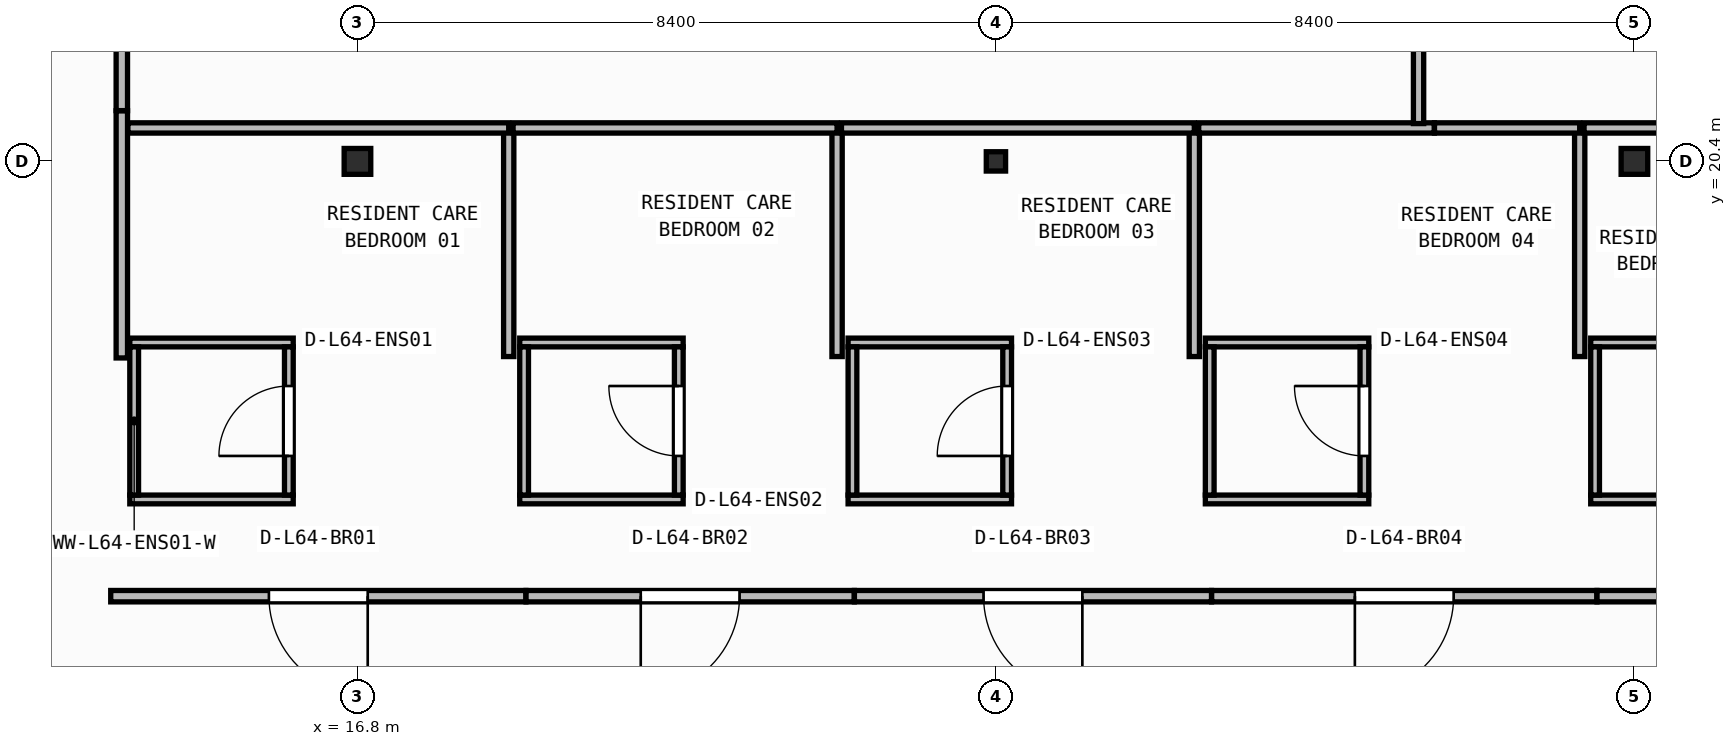
"""IFC4 building model, lengths in metres.
Left out: names, types, materials, properties, quantities, classifications, styles, units other than length and angle.
Written with IfcOpenShell. Run it as: python <this file> out.ifc"""

import sys

from ifc_helpers import new_model, si_unit, direction, frame, frame_2d, origin, origin_2d, place, context, subcontext, project, spatial, rectangle, i_section, extrude, element, fill, save


model = new_model("IFC4")
c1 = context("Model", 3, precision=1e-05, world=origin(), true_north=direction((0.0, 1.0)))
c2 = subcontext(c1, "Body", "Model", "MODEL_VIEW")
j1 = project(units=[si_unit("LENGTHUNIT", "METRE"), si_unit("PLANEANGLEUNIT", "RADIAN")], contexts=[c1])
p1 = place(None, origin())
s1 = spatial("IfcSite", under=j1, at=p1, CompositionType="ELEMENT")
p2 = place(p1, origin())
s2 = spatial("IfcBuilding", under=s1, at=p2, CompositionType="ELEMENT")
p3 = place(p2, frame((0.0, 0.0, 260.5)))
s3 = spatial("IfcBuildingStorey", under=s2, at=p3, CompositionType="ELEMENT", Elevation=260.5)
p4 = place(p3, frame((16.8, 20.4, 0.0), z_axis=(0.0, 0.0, 1.0), x_axis=(1.0, 0.0, 0.0)))
e1 = element("IfcColumn", 1, at=p4, inside=s3, PredefinedType="COLUMN", context=c2, shape_type="SweptSolid", body=[
    extrude(i_section(OverallWidth=0.35, OverallDepth=0.34, WebThickness=0.016, FlangeThickness=0.028, at=origin_2d()), origin(), (0.0, 0.0, 1.0), 3.95),
])
p5 = place(p3, frame((25.2, 20.4, 0.0), z_axis=(0.0, 0.0, 1.0), x_axis=(1.0, 0.0, 0.0)))
e2 = element("IfcColumn", 2, at=p5, inside=s3, PredefinedType="COLUMN", context=c2, shape_type="SweptSolid", body=[
    extrude(i_section(OverallWidth=0.254, OverallDepth=0.254, WebThickness=0.009, FlangeThickness=0.014, FilletRadius=0.013, at=origin_2d()), origin(), (0.0, 0.0, 1.0), 3.95),
])
p6 = place(p3, frame((33.6, 20.4, 0.0), z_axis=(0.0, 0.0, 1.0), x_axis=(1.0, 0.0, 0.0)))
e3 = element("IfcColumn", 3, at=p6, inside=s3, PredefinedType="COLUMN", context=c2, shape_type="SweptSolid", body=[
    extrude(i_section(OverallWidth=0.35, OverallDepth=0.34, WebThickness=0.016, FlangeThickness=0.028, at=origin_2d()), origin(), (0.0, 0.0, 1.0), 3.95),
])
for number, where, z_axis, x_axis in (
    (4, (13.805, 15.952, 0.0), (0.0, 0.0, 1.0), (1.0, 0.0, 0.0)),
    (5, (13.805, 18.018, 0.0), (0.0, 0.0, 1.0), (1.0, 0.0, 0.0)),
):
    element("IfcWall", number, at=place(p3, frame(where, z_axis=z_axis, x_axis=x_axis)), inside=s3, PredefinedType="PARTITIONING", context=c2, shape_type="SweptSolid", body=[
        extrude(rectangle(XDim=2.15, YDim=0.115, at=frame_2d((1.075, 0.0))), origin(), (0.0, 0.0, 1.0), 3.71),
    ])
p7 = place(p3, frame((13.863, 16.01, 0.0), z_axis=(0.0, 0.0, 1.0), x_axis=(0.0, 1.0, 0.0)))
e6 = element("IfcWall", 6, at=p7, inside=s3, PredefinedType="PARTITIONING", context=c2, shape_type="SweptSolid", body=[
    extrude(rectangle(XDim=1.95, YDim=0.115, at=frame_2d((0.975, 0.0))), origin(), (0.0, 0.0, 1.0), 3.71),
])
p8 = place(p3, frame((15.897, 16.01, 0.0), z_axis=(0.0, 0.0, 1.0), x_axis=(0.0, 1.0, 0.0)))
e7 = element("IfcWall", 7, at=p8, inside=s3, PredefinedType="PARTITIONING", context=c2, shape_type="SweptSolid", body=[
    extrude(rectangle(XDim=1.95, YDim=0.115, at=frame_2d((0.975, 0.0))), origin(), (0.0, 0.0, 1.0), 3.71),
])
p9 = place(p8, frame((0.515, 0.0, 0.0)))
e8 = element("IfcOpeningElement", 8, at=p9, cuts=e7, PredefinedType="OPENING", context=c2, shape_type="SweptSolid", body=[
    extrude(rectangle(XDim=0.92, YDim=2.1, at=frame_2d((0.46, 1.05))), frame((0.0, 0.067, 0.0), z_axis=(0.0, -1.0, 0.0), x_axis=(1.0, 0.0, 0.0)), (0.0, 0.0, 1.0), 0.135),
])
for number, where, z_axis, x_axis in (
    (9, (18.935, 15.952, 0.0), (0.0, 0.0, 1.0), (1.0, 0.0, 0.0)),
    (10, (18.935, 18.018, 0.0), (0.0, 0.0, 1.0), (1.0, 0.0, 0.0)),
):
    element("IfcWall", number, at=place(p3, frame(where, z_axis=z_axis, x_axis=x_axis)), inside=s3, PredefinedType="PARTITIONING", context=c2, shape_type="SweptSolid", body=[
        extrude(rectangle(XDim=2.15, YDim=0.115, at=frame_2d((1.075, 0.0))), origin(), (0.0, 0.0, 1.0), 3.71),
    ])
p10 = place(p3, frame((18.992, 16.01, 0.0), z_axis=(0.0, 0.0, 1.0), x_axis=(0.0, 1.0, 0.0)))
e11 = element("IfcWall", 11, at=p10, inside=s3, PredefinedType="PARTITIONING", context=c2, shape_type="SweptSolid", body=[
    extrude(rectangle(XDim=1.95, YDim=0.115, at=frame_2d((0.975, 0.0))), origin(), (0.0, 0.0, 1.0), 3.71),
])
p11 = place(p3, frame((21.028, 16.01, 0.0), z_axis=(0.0, 0.0, 1.0), x_axis=(0.0, 1.0, 0.0)))
e12 = element("IfcWall", 12, at=p11, inside=s3, PredefinedType="PARTITIONING", context=c2, shape_type="SweptSolid", body=[
    extrude(rectangle(XDim=1.95, YDim=0.115, at=frame_2d((0.975, 0.0))), origin(), (0.0, 0.0, 1.0), 3.71),
])
p12 = place(p11, frame((0.515, 0.0, 0.0)))
e13 = element("IfcOpeningElement", 13, at=p12, cuts=e12, PredefinedType="OPENING", context=c2, shape_type="SweptSolid", body=[
    extrude(rectangle(XDim=0.92, YDim=2.1, at=frame_2d((0.46, 1.05))), frame((0.0, 0.067, 0.0), z_axis=(0.0, -1.0, 0.0), x_axis=(1.0, 0.0, 0.0)), (0.0, 0.0, 1.0), 0.135),
])
p13 = place(p3, frame((23.255, 15.952, 0.0), z_axis=(0.0, 0.0, 1.0), x_axis=(1.0, 0.0, 0.0)))
e14 = element("IfcWall", 14, at=p13, inside=s3, PredefinedType="PARTITIONING", context=c2, shape_type="SweptSolid", body=[
    extrude(rectangle(XDim=2.15, YDim=0.115, at=frame_2d((1.075, 0.0))), origin(), (0.0, 0.0, 1.0), 3.429),
])
p14 = place(p3, frame((23.255, 18.018, 0.0), z_axis=(0.0, 0.0, 1.0), x_axis=(1.0, 0.0, 0.0)))
e15 = element("IfcWall", 15, at=p14, inside=s3, PredefinedType="PARTITIONING", context=c2, shape_type="SweptSolid", body=[
    extrude(rectangle(XDim=2.15, YDim=0.115, at=frame_2d((1.075, 0.0))), origin(), (0.0, 0.0, 1.0), 3.71),
])
p15 = place(p3, frame((23.312, 16.01, 0.0), z_axis=(0.0, 0.0, 1.0), x_axis=(0.0, 1.0, 0.0)))
e16 = element("IfcWall", 16, at=p15, inside=s3, PredefinedType="PARTITIONING", context=c2, shape_type="SweptSolid", body=[
    extrude(rectangle(XDim=1.95, YDim=0.115, at=frame_2d((0.975, 0.0))), origin(), (0.0, 0.0, 1.0), 3.71),
])
p16 = place(p3, frame((25.347, 16.01, 0.0), z_axis=(0.0, 0.0, 1.0), x_axis=(0.0, 1.0, 0.0)))
e17 = element("IfcWall", 17, at=p16, inside=s3, PredefinedType="PARTITIONING", context=c2, shape_type="SweptSolid", body=[
    extrude(rectangle(XDim=1.95, YDim=0.115, at=frame_2d((0.975, 0.0))), origin(), (0.0, 0.0, 1.0), 3.157),
])
p17 = place(p16, frame((0.515, 0.0, 0.0)))
e18 = element("IfcOpeningElement", 18, at=p17, cuts=e17, PredefinedType="OPENING", context=c2, shape_type="SweptSolid", body=[
    extrude(rectangle(XDim=0.92, YDim=2.1, at=frame_2d((0.46, 1.05))), frame((0.0, 0.067, 0.0), z_axis=(0.0, -1.0, 0.0), x_axis=(1.0, 0.0, 0.0)), (0.0, 0.0, 1.0), 0.135),
])
p18 = place(p3, frame((27.955, 15.952, 0.0), z_axis=(0.0, 0.0, 1.0), x_axis=(1.0, 0.0, 0.0)))
e19 = element("IfcWall", 19, at=p18, inside=s3, PredefinedType="PARTITIONING", context=c2, shape_type="SweptSolid", body=[
    extrude(rectangle(XDim=2.15, YDim=0.115, at=frame_2d((1.075, 0.0))), origin(), (0.0, 0.0, 1.0), 3.429),
])
p19 = place(p3, frame((27.955, 18.018, 0.0), z_axis=(0.0, 0.0, 1.0), x_axis=(1.0, 0.0, 0.0)))
e20 = element("IfcWall", 20, at=p19, inside=s3, PredefinedType="PARTITIONING", context=c2, shape_type="SweptSolid", body=[
    extrude(rectangle(XDim=2.15, YDim=0.115, at=frame_2d((1.075, 0.0))), origin(), (0.0, 0.0, 1.0), 3.71),
])
p20 = place(p3, frame((28.012, 16.01, 0.0), z_axis=(0.0, 0.0, 1.0), x_axis=(0.0, 1.0, 0.0)))
e21 = element("IfcWall", 21, at=p20, inside=s3, PredefinedType="PARTITIONING", context=c2, shape_type="SweptSolid", body=[
    extrude(rectangle(XDim=1.95, YDim=0.115, at=frame_2d((0.975, 0.0))), origin(), (0.0, 0.0, 1.0), 3.71),
])
p21 = place(p3, frame((30.048, 16.01, 0.0), z_axis=(0.0, 0.0, 1.0), x_axis=(0.0, 1.0, 0.0)))
e22 = element("IfcWall", 22, at=p21, inside=s3, PredefinedType="PARTITIONING", context=c2, shape_type="SweptSolid", body=[
    extrude(rectangle(XDim=1.95, YDim=0.115, at=frame_2d((0.975, 0.0))), origin(), (0.0, 0.0, 1.0), 3.71),
])
p22 = place(p21, frame((0.515, 0.0, 0.0)))
e23 = element("IfcOpeningElement", 23, at=p22, cuts=e22, PredefinedType="OPENING", context=c2, shape_type="SweptSolid", body=[
    extrude(rectangle(XDim=0.92, YDim=2.1, at=frame_2d((0.46, 1.05))), frame((0.0, 0.067, 0.0), z_axis=(0.0, -1.0, 0.0), x_axis=(1.0, 0.0, 0.0)), (0.0, 0.0, 1.0), 0.135),
])
p23 = place(p3, frame((33.025, 15.952, 0.0), z_axis=(0.0, 0.0, 1.0), x_axis=(1.0, 0.0, 0.0)))
e24 = element("IfcWall", 24, at=p23, inside=s3, PredefinedType="PARTITIONING", context=c2, shape_type="SweptSolid", body=[
    extrude(rectangle(XDim=2.15, YDim=0.115, at=frame_2d((1.075, 0.0))), origin(), (0.0, 0.0, 1.0), 3.429),
])
p24 = place(p3, frame((33.025, 18.018, 0.0), z_axis=(0.0, 0.0, 1.0), x_axis=(1.0, 0.0, 0.0)))
e25 = element("IfcWall", 25, at=p24, inside=s3, PredefinedType="PARTITIONING", context=c2, shape_type="SweptSolid", body=[
    extrude(rectangle(XDim=2.15, YDim=0.115, at=frame_2d((1.075, 0.0))), origin(), (0.0, 0.0, 1.0), 3.71),
])
p25 = place(p3, frame((33.083, 16.01, 0.0), z_axis=(0.0, 0.0, 1.0), x_axis=(0.0, 1.0, 0.0)))
e26 = element("IfcWall", 26, at=p25, inside=s3, PredefinedType="PARTITIONING", context=c2, shape_type="SweptSolid", body=[
    extrude(rectangle(XDim=1.95, YDim=0.115, at=frame_2d((0.975, 0.0))), origin(), (0.0, 0.0, 1.0), 3.71),
])
p26 = place(p3, frame((19.016, 14.68, 0.0), z_axis=(0.0, 0.0, 1.0), x_axis=(-1.0, 0.0, 0.0)))
e27 = element("IfcWall", 27, at=p26, inside=s3, PredefinedType="PARTITIONING", context=c2, shape_type="SweptSolid", body=[
    extrude(rectangle(XDim=5.462, YDim=0.15, at=frame_2d((2.731, 0.0))), origin(), (0.0, 0.0, 1.0), 3.71),
])
p27 = place(p26, frame((2.081, 0.0, 0.0)))
e28 = element("IfcOpeningElement", 28, at=p27, cuts=e27, PredefinedType="OPENING", context=c2, shape_type="SweptSolid", body=[
    extrude(rectangle(XDim=1.3, YDim=2.15, at=frame_2d((0.65, 1.075))), frame((0.0, 0.085, 0.0), z_axis=(0.0, -1.0, 0.0), x_axis=(1.0, 0.0, 0.0)), (0.0, 0.0, 1.0), 0.17),
])
p28 = place(p3, frame((23.336, 14.68, 0.0), z_axis=(0.0, 0.0, 1.0), x_axis=(-1.0, 0.0, 0.0)))
e29 = element("IfcWall", 29, at=p28, inside=s3, PredefinedType="PARTITIONING", context=c2, shape_type="SweptSolid", body=[
    extrude(rectangle(XDim=4.318, YDim=0.15, at=frame_2d((2.159, 0.0))), origin(), (0.0, 0.0, 1.0), 3.71),
])
p29 = place(p28, frame((1.509, 0.0, 0.0)))
e30 = element("IfcOpeningElement", 30, at=p29, cuts=e29, PredefinedType="OPENING", context=c2, shape_type="SweptSolid", body=[
    extrude(rectangle(XDim=1.3, YDim=2.15, at=frame_2d((0.65, 1.075))), frame((0.0, 0.085, 0.0), z_axis=(0.0, -1.0, 0.0), x_axis=(1.0, 0.0, 0.0)), (0.0, 0.0, 1.0), 0.17),
])
p30 = place(p3, frame((28.036, 14.68, 0.0), z_axis=(0.0, 0.0, 1.0), x_axis=(-1.0, 0.0, 0.0)))
e31 = element("IfcWall", 31, at=p30, inside=s3, PredefinedType="PARTITIONING", context=c2, shape_type="SweptSolid", body=[
    extrude(rectangle(XDim=4.698, YDim=0.15, at=frame_2d((2.349, 0.0))), origin(), (0.0, 0.0, 1.0), 3.71),
])
p31 = place(p30, frame((1.699, 0.0, 0.0)))
e32 = element("IfcOpeningElement", 32, at=p31, cuts=e31, PredefinedType="OPENING", context=c2, shape_type="SweptSolid", body=[
    extrude(rectangle(XDim=1.3, YDim=2.15, at=frame_2d((0.65, 1.075))), frame((0.0, 0.085, 0.0), z_axis=(0.0, -1.0, 0.0), x_axis=(1.0, 0.0, 0.0)), (0.0, 0.0, 1.0), 0.17),
])
p32 = place(p3, frame((33.106, 14.68, 0.0), z_axis=(0.0, 0.0, 1.0), x_axis=(-1.0, 0.0, 0.0)))
e33 = element("IfcWall", 33, at=p32, inside=s3, PredefinedType="PARTITIONING", context=c2, shape_type="SweptSolid", body=[
    extrude(rectangle(XDim=5.068, YDim=0.15, at=frame_2d((2.534, 0.0))), origin(), (0.0, 0.0, 1.0), 3.71),
])
p33 = place(p32, frame((1.884, 0.0, 0.0)))
e34 = element("IfcOpeningElement", 34, at=p33, cuts=e33, PredefinedType="OPENING", context=c2, shape_type="SweptSolid", body=[
    extrude(rectangle(XDim=1.3, YDim=2.15, at=frame_2d((0.65, 1.075))), frame((0.0, 0.085, 0.0), z_axis=(0.0, -1.0, 0.0), x_axis=(1.0, 0.0, 0.0)), (0.0, 0.0, 1.0), 0.17),
])
p34 = place(p3, frame((37.426, 14.68, 0.0), z_axis=(0.0, 0.0, 1.0), x_axis=(-1.0, 0.0, 0.0)))
e35 = element("IfcWall", 35, at=p34, inside=s3, PredefinedType="PARTITIONING", context=c2, shape_type="SweptSolid", body=[
    extrude(rectangle(XDim=4.318, YDim=0.15, at=frame_2d((2.159, 0.0))), origin(), (0.0, 0.0, 1.0), 3.71),
])
p35 = place(p34, frame((1.509, 0.0, 0.0)))
e36 = element("IfcOpeningElement", 36, at=p35, cuts=e35, PredefinedType="OPENING", context=c2, shape_type="SweptSolid", body=[
    extrude(rectangle(XDim=1.3, YDim=2.15, at=frame_2d((0.65, 1.075))), frame((0.0, 0.085, 0.0), z_axis=(0.0, -1.0, 0.0), x_axis=(1.0, 0.0, 0.0)), (0.0, 0.0, 1.0), 0.17),
])
p36 = place(p3, frame((13.7, 17.814, 0.0), z_axis=(0.0, 0.0, 1.0), x_axis=(0.0, 1.0, 0.0)))
e37 = element("IfcWall", 37, at=p36, inside=s3, PredefinedType="PARTITIONING", context=c2, shape_type="SweptSolid", body=[
    extrude(rectangle(XDim=3.252, YDim=0.15, at=frame_2d((1.626, 0.0))), origin(), (0.0, 0.0, 1.0), 3.71),
])
p37 = place(p3, frame((13.7, 21.068, 0.0), z_axis=(0.0, 0.0, 1.0), x_axis=(0.0, 1.0, 0.0)))
e38 = element("IfcWall", 38, at=p37, inside=s3, PredefinedType="PARTITIONING", context=c2, shape_type="SweptSolid", body=[
    extrude(rectangle(XDim=6.192, YDim=0.15, at=frame_2d((3.096, 0.0))), origin(), (0.0, 0.0, 1.0), 3.71),
])
p38 = place(p37, frame((2.546, 0.0, 0.0)))
e39 = element("IfcOpeningElement", 39, at=p38, cuts=e38, PredefinedType="OPENING", context=c2, shape_type="SweptSolid", body=[
    extrude(rectangle(XDim=1.1, YDim=2.1, at=frame_2d((0.55, 1.05))), frame((0.0, 0.085, 0.0), z_axis=(0.0, -1.0, 0.0), x_axis=(1.0, 0.0, 0.0)), (0.0, 0.0, 1.0), 0.17),
])
p39 = place(p3, frame((18.79, 17.833, 0.0), z_axis=(0.0, 0.0, 1.0), x_axis=(0.0, 1.0, 0.0)))
e40 = element("IfcWall", 40, at=p39, inside=s3, PredefinedType="PARTITIONING", context=c2, shape_type="SweptSolid", body=[
    extrude(rectangle(XDim=3.008, YDim=0.135, at=frame_2d((1.504, 0.0))), origin(), (0.0, 0.0, 1.0), 3.71),
])
p40 = place(p3, frame((18.79, 20.84, 0.0), z_axis=(0.0, 0.0, 1.0), x_axis=(-1.0, 0.0, 0.0)))
e41 = element("IfcWall", 41, at=p40, inside=s3, PredefinedType="PARTITIONING", context=c2, shape_type="SweptSolid", body=[
    extrude(rectangle(XDim=5.01, YDim=0.135, at=frame_2d((2.505, 0.0))), origin(), (0.0, 0.0, 1.0), 3.157),
])
p41 = place(p3, frame((23.11, 17.833, 0.0), z_axis=(0.0, 0.0, 1.0), x_axis=(0.0, 1.0, 0.0)))
e42 = element("IfcWall", 42, at=p41, inside=s3, PredefinedType="PARTITIONING", context=c2, shape_type="SweptSolid", body=[
    extrude(rectangle(XDim=3.008, YDim=0.135, at=frame_2d((1.504, 0.0))), origin(), (0.0, 0.0, 1.0), 3.71),
])
p42 = place(p3, frame((23.11, 20.84, 0.0), z_axis=(0.0, 0.0, 1.0), x_axis=(-1.0, 0.0, 0.0)))
e43 = element("IfcWall", 43, at=p42, inside=s3, PredefinedType="PARTITIONING", context=c2, shape_type="SweptSolid", body=[
    extrude(rectangle(XDim=4.263, YDim=0.135, at=frame_2d((2.131, 0.0))), origin(), (0.0, 0.0, 1.0), 3.157),
])
p43 = place(p3, frame((27.81, 17.833, 0.0), z_axis=(0.0, 0.0, 1.0), x_axis=(0.0, 1.0, 0.0)))
e44 = element("IfcWall", 44, at=p43, inside=s3, PredefinedType="PARTITIONING", context=c2, shape_type="SweptSolid", body=[
    extrude(rectangle(XDim=3.008, YDim=0.135, at=frame_2d((1.504, 0.0))), origin(), (0.0, 0.0, 1.0), 3.71),
])
p44 = place(p3, frame((27.81, 20.84, 0.0), z_axis=(0.0, 0.0, 1.0), x_axis=(-1.0, 0.0, 0.0)))
e45 = element("IfcWall", 45, at=p44, inside=s3, PredefinedType="PARTITIONING", context=c2, shape_type="SweptSolid", body=[
    extrude(rectangle(XDim=4.643, YDim=0.135, at=frame_2d((2.321, 0.0))), origin(), (0.0, 0.0, 1.0), 3.157),
])
p45 = place(p3, frame((32.88, 17.833, 0.0), z_axis=(0.0, 0.0, 1.0), x_axis=(0.0, 1.0, 0.0)))
e46 = element("IfcWall", 46, at=p45, inside=s3, PredefinedType="PARTITIONING", context=c2, shape_type="SweptSolid", body=[
    extrude(rectangle(XDim=3.008, YDim=0.135, at=frame_2d((1.504, 0.0))), origin(), (0.0, 0.0, 1.0), 3.71),
])
p46 = place(p3, frame((30.968, 20.84, 0.0), z_axis=(0.0, 0.0, 1.0), x_axis=(-1.0, 0.0, 0.0)))
e47 = element("IfcWall", 47, at=p46, inside=s3, PredefinedType="PARTITIONING", context=c2, shape_type="SweptSolid", body=[
    extrude(rectangle(XDim=3.1, YDim=0.135, at=frame_2d((1.55, 0.0))), origin(), (0.0, 0.0, 1.0), 3.157),
])
p47 = place(p3, frame((32.88, 20.84, 0.0), z_axis=(0.0, 0.0, 1.0), x_axis=(-1.0, 0.0, 0.0)))
e48 = element("IfcWall", 48, at=p47, inside=s3, PredefinedType="PARTITIONING", context=c2, shape_type="SweptSolid", body=[
    extrude(rectangle(XDim=1.91, YDim=0.135, at=frame_2d((0.955, 0.0))), origin(), (0.0, 0.0, 1.0), 3.157),
])
p48 = place(p3, frame((37.2, 20.84, 0.0), z_axis=(0.0, 0.0, 1.0), x_axis=(-1.0, 0.0, 0.0)))
e49 = element("IfcWall", 49, at=p48, inside=s3, PredefinedType="PARTITIONING", context=c2, shape_type="SweptSolid", body=[
    extrude(rectangle(XDim=4.262, YDim=0.135, at=frame_2d((2.131, 0.0))), origin(), (0.0, 0.0, 1.0), 3.157),
])
p49 = place(p3, frame((30.76, 20.897, 0.0), z_axis=(0.0, 0.0, 1.0), x_axis=(0.0, 1.0, 0.0)))
e50 = element("IfcWall", 50, at=p49, inside=s3, PredefinedType="PARTITIONING", context=c2, shape_type="SweptSolid", body=[
    extrude(rectangle(XDim=6.242, YDim=0.135, at=frame_2d((3.121, 0.0))), origin(), (0.0, 0.0, 1.0), 3.71),
])
p50 = place(p49, frame((2.571, 0.0, 0.0)))
e51 = element("IfcOpeningElement", 51, at=p50, cuts=e50, PredefinedType="OPENING", context=c2, shape_type="SweptSolid", body=[
    extrude(rectangle(XDim=1.1, YDim=2.1, at=frame_2d((0.55, 1.05))), frame((0.0, 0.077, 0.0), z_axis=(0.0, -1.0, 0.0), x_axis=(1.0, 0.0, 0.0)), (0.0, 0.0, 1.0), 0.155),
])
p51 = place(p9, origin())
e52 = element("IfcDoor", 52, at=p51, inside=s3, OperationType="SINGLE_SWING_LEFT", PredefinedType="DOOR", context=c2, shape_type="SweptSolid", body=[
    extrude(rectangle(XDim=0.92, YDim=2.1, at=frame_2d((0.46, 1.05))), frame((0.0, 0.025, 0.0), z_axis=(0.0, -1.0, 0.0), x_axis=(1.0, 0.0, 0.0)), (0.0, 0.0, 1.0), 0.05),
])
fill(e8, e52)
p52 = place(p12, origin())
e53 = element("IfcDoor", 53, at=p52, inside=s3, OperationType="SINGLE_SWING_RIGHT", PredefinedType="DOOR", context=c2, shape_type="SweptSolid", body=[
    extrude(rectangle(XDim=0.92, YDim=2.1, at=frame_2d((0.46, 1.05))), frame((0.0, 0.025, 0.0), z_axis=(0.0, -1.0, 0.0), x_axis=(1.0, 0.0, 0.0)), (0.0, 0.0, 1.0), 0.05),
])
fill(e13, e53)
p53 = place(p17, origin())
e54 = element("IfcDoor", 54, at=p53, inside=s3, OperationType="SINGLE_SWING_LEFT", PredefinedType="DOOR", context=c2, shape_type="SweptSolid", body=[
    extrude(rectangle(XDim=0.92, YDim=2.1, at=frame_2d((0.46, 1.05))), frame((0.0, 0.025, 0.0), z_axis=(0.0, -1.0, 0.0), x_axis=(1.0, 0.0, 0.0)), (0.0, 0.0, 1.0), 0.05),
])
fill(e18, e54)
p54 = place(p22, origin())
e55 = element("IfcDoor", 55, at=p54, inside=s3, OperationType="SINGLE_SWING_RIGHT", PredefinedType="DOOR", context=c2, shape_type="SweptSolid", body=[
    extrude(rectangle(XDim=0.92, YDim=2.1, at=frame_2d((0.46, 1.05))), frame((0.0, 0.025, 0.0), z_axis=(0.0, -1.0, 0.0), x_axis=(1.0, 0.0, 0.0)), (0.0, 0.0, 1.0), 0.05),
])
fill(e23, e55)
p55 = place(p27, origin())
e56 = element("IfcDoor", 56, at=p55, inside=s3, OperationType="SINGLE_SWING_LEFT", PredefinedType="DOOR", context=c2, shape_type="SweptSolid", body=[
    extrude(rectangle(XDim=1.3, YDim=2.15, at=frame_2d((0.65, 1.075))), frame((0.0, 0.025, 0.0), z_axis=(0.0, -1.0, 0.0), x_axis=(1.0, 0.0, 0.0)), (0.0, 0.0, 1.0), 0.05),
])
fill(e28, e56)
p56 = place(p29, origin())
e57 = element("IfcDoor", 57, at=p56, inside=s3, OperationType="SINGLE_SWING_RIGHT", PredefinedType="DOOR", context=c2, shape_type="SweptSolid", body=[
    extrude(rectangle(XDim=1.3, YDim=2.15, at=frame_2d((0.65, 1.075))), frame((0.0, 0.025, 0.0), z_axis=(0.0, -1.0, 0.0), x_axis=(1.0, 0.0, 0.0)), (0.0, 0.0, 1.0), 0.05),
])
fill(e30, e57)
p57 = place(p31, origin())
e58 = element("IfcDoor", 58, at=p57, inside=s3, OperationType="SINGLE_SWING_LEFT", PredefinedType="DOOR", context=c2, shape_type="SweptSolid", body=[
    extrude(rectangle(XDim=1.3, YDim=2.15, at=frame_2d((0.65, 1.075))), frame((0.0, 0.025, 0.0), z_axis=(0.0, -1.0, 0.0), x_axis=(1.0, 0.0, 0.0)), (0.0, 0.0, 1.0), 0.05),
])
fill(e32, e58)
p58 = place(p33, origin())
e59 = element("IfcDoor", 59, at=p58, inside=s3, OperationType="SINGLE_SWING_RIGHT", PredefinedType="DOOR", context=c2, shape_type="SweptSolid", body=[
    extrude(rectangle(XDim=1.3, YDim=2.15, at=frame_2d((0.65, 1.075))), frame((0.0, 0.025, 0.0), z_axis=(0.0, -1.0, 0.0), x_axis=(1.0, 0.0, 0.0)), (0.0, 0.0, 1.0), 0.05),
])
fill(e34, e59)
save(model, sys.argv[1])
